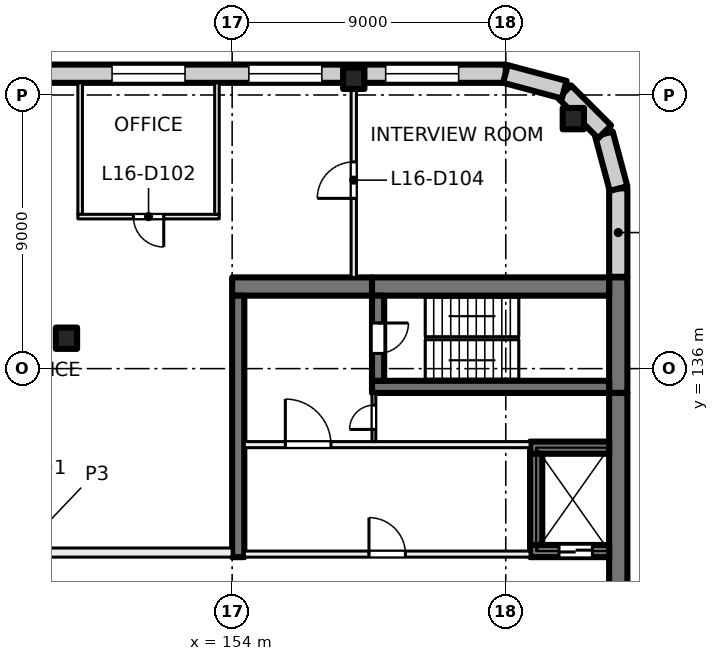
"""IFC4 building model, lengths in metres.
Left out: names, types, materials, properties, quantities, classifications, styles, units other than length and angle.
Written with IfcOpenShell. Run it as: python <this file> out.ifc"""

import sys

from ifc_helpers import new_model, si_unit, direction, frame, frame_2d, origin, origin_2d, place, context, subcontext, project, spatial, rectangle, extrude, element, fill, save


model = new_model("IFC4")
c1 = context("Model", 3, precision=1e-05, world=origin(), true_north=direction((0.0, 1.0)))
c2 = subcontext(c1, "Body", "Model", "MODEL_VIEW")
j1 = project(units=[si_unit("LENGTHUNIT", "METRE"), si_unit("PLANEANGLEUNIT", "RADIAN")], contexts=[c1])
p1 = place(None, origin())
s1 = spatial("IfcSite", under=j1, at=p1, CompositionType="ELEMENT")
p2 = place(p1, origin())
s2 = spatial("IfcBuilding", under=s1, at=p2, CompositionType="ELEMENT")
p3 = place(p2, frame((0.0, 0.0, 71.5)))
s3 = spatial("IfcBuildingStorey", under=s2, at=p3, CompositionType="ELEMENT", Elevation=71.5)
for number, where, z_axis, x_axis in (
    (1, (148.55, 137.0, 0.0), (0.0, 0.0, 1.0), (1.0, 0.0, 0.0)),
    (2, (165.223, 144.223, 0.0), (0.0, 0.0, 1.0), (1.0, 0.0, 0.0)),
    (3, (158.0, 145.55, 0.0), (0.0, 0.0, 1.0), (1.0, 0.0, 0.0)),
):
    element("IfcColumn", number, at=place(p3, frame(where, z_axis=z_axis, x_axis=x_axis)), inside=s3, PredefinedType="COLUMN", context=c2, shape_type="SweptSolid", body=[
        extrude(rectangle(XDim=0.7, YDim=0.7, at=origin_2d()), origin(), (0.0, 0.0, 1.0), 4.0),
    ])
p4 = place(p3, frame((166.7, 139.0, 0.0), z_axis=(0.0, 0.0, 1.0), x_axis=(0.0, -1.0, 0.0)))
e4 = element("IfcWall", 4, at=p4, inside=s3, PredefinedType="SHEAR", context=c2, shape_type="SweptSolid", body=[
    extrude(rectangle(XDim=3.8, YDim=0.6, at=frame_2d((1.9, 0.0))), origin(), (0.0, 0.0, 1.0), 4.0),
])
p5 = place(p3, frame((166.7, 135.2, 0.0), z_axis=(0.0, 0.0, 1.0), x_axis=(0.0, -1.0, 0.0)))
e5 = element("IfcWall", 5, at=p5, inside=s3, PredefinedType="SHEAR", context=c2, shape_type="SweptSolid", body=[
    extrude(rectangle(XDim=14.4, YDim=0.6, at=frame_2d((7.2, 0.0))), origin(), (0.0, 0.0, 1.0), 4.0),
])
p6 = place(p3, frame((166.4, 138.7, 0.0), z_axis=(0.0, 0.0, 1.0), x_axis=(-1.0, 0.0, 0.0)))
e6 = element("IfcWall", 6, at=p6, inside=s3, PredefinedType="SHEAR", context=c2, shape_type="SweptSolid", body=[
    extrude(rectangle(XDim=7.8, YDim=0.6, at=frame_2d((3.9, 0.0))), origin(), (0.0, 0.0, 1.0), 4.0),
])
p7 = place(p3, frame((158.6, 138.7, 0.0), z_axis=(0.0, 0.0, 1.0), x_axis=(-1.0, 0.0, 0.0)))
e7 = element("IfcWall", 7, at=p7, inside=s3, PredefinedType="SHEAR", context=c2, shape_type="SweptSolid", body=[
    extrude(rectangle(XDim=4.6, YDim=0.6, at=frame_2d((2.3, 0.0))), origin(), (0.0, 0.0, 1.0), 4.0),
])
p8 = place(p3, frame((166.4, 135.4, 0.0), z_axis=(0.0, 0.0, 1.0), x_axis=(-1.0, 0.0, 0.0)))
e8 = element("IfcWall", 8, at=p8, inside=s3, PredefinedType="SHEAR", context=c2, shape_type="SweptSolid", body=[
    extrude(rectangle(XDim=7.8, YDim=0.4, at=frame_2d((3.9, 0.0))), origin(), (0.0, 0.0, 1.0), 4.0),
])
p9 = place(p3, frame((158.8, 138.4, 0.0), z_axis=(0.0, 0.0, 1.0), x_axis=(0.0, -1.0, 0.0)))
e9 = element("IfcWall", 9, at=p9, inside=s3, PredefinedType="SHEAR", context=c2, shape_type="SweptSolid", body=[
    extrude(rectangle(XDim=2.8, YDim=0.4, at=frame_2d((1.4, 0.0))), origin(), (0.0, 0.0, 1.0), 4.0),
])
p10 = place(p9, frame((0.9, 0.0, 0.0)))
e10 = element("IfcOpeningElement", 10, at=p10, cuts=e9, PredefinedType="OPENING", context=c2, shape_type="SweptSolid", body=[
    extrude(rectangle(XDim=1.0, YDim=2.1, at=frame_2d((0.5, 1.05))), frame((0.0, 0.21, 0.0), z_axis=(0.0, -1.0, 0.0), x_axis=(1.0, 0.0, 0.0)), (0.0, 0.0, 1.0), 0.42),
])
p11 = place(p3, frame((166.4, 130.0, 0.0), z_axis=(0.0, 0.0, 1.0), x_axis=(-1.0, 0.0, 0.0)))
e11 = element("IfcWall", 11, at=p11, inside=s3, PredefinedType="SHEAR", context=c2, shape_type="SweptSolid", body=[
    extrude(rectangle(XDim=2.6, YDim=0.4, at=frame_2d((1.3, 0.0))), origin(), (0.0, 0.0, 1.0), 4.0),
])
p12 = place(p11, frame((0.55, 0.0, 0.0)))
e12 = element("IfcOpeningElement", 12, at=p12, cuts=e11, PredefinedType="OPENING", context=c2, shape_type="SweptSolid", body=[
    extrude(rectangle(XDim=1.1, YDim=2.1, at=frame_2d((0.55, 1.05))), frame((0.0, 0.21, 0.0), z_axis=(0.0, -1.0, 0.0), x_axis=(1.0, 0.0, 0.0)), (0.0, 0.0, 1.0), 0.42),
])
p13 = place(p3, frame((166.4, 133.4, 0.0), z_axis=(0.0, 0.0, 1.0), x_axis=(-1.0, 0.0, 0.0)))
e13 = element("IfcWall", 13, at=p13, inside=s3, PredefinedType="SHEAR", context=c2, shape_type="SweptSolid", body=[
    extrude(rectangle(XDim=2.6, YDim=0.4, at=frame_2d((1.3, 0.0))), origin(), (0.0, 0.0, 1.0), 4.0),
])
p14 = place(p3, frame((164.0, 133.2, 0.0), z_axis=(0.0, 0.0, 1.0), x_axis=(0.0, -1.0, 0.0)))
e14 = element("IfcWall", 14, at=p14, inside=s3, PredefinedType="SHEAR", context=c2, shape_type="SweptSolid", body=[
    extrude(rectangle(XDim=3.0, YDim=0.4, at=frame_2d((1.5, 0.0))), origin(), (0.0, 0.0, 1.0), 4.0),
])
p15 = place(p3, frame((154.2, 138.4, 0.0), z_axis=(0.0, 0.0, 1.0), x_axis=(0.0, -1.0, 0.0)))
e15 = element("IfcWall", 15, at=p15, inside=s3, PredefinedType="SHEAR", context=c2, shape_type="SweptSolid", body=[
    extrude(rectangle(XDim=8.6, YDim=0.4, at=frame_2d((4.3, 0.0))), origin(), (0.0, 0.0, 1.0), 4.0),
])
p16 = place(p3, frame((131.07, 145.7, 0.0), z_axis=(0.0, 0.0, 1.0), x_axis=(1.0, 0.0, 0.0)))
e16 = element("IfcWall", 16, at=p16, inside=s3, PredefinedType="SOLIDWALL", context=c2, shape_type="SweptSolid", body=[
    extrude(rectangle(XDim=31.93, YDim=0.6, at=frame_2d((15.965, 0.0))), origin(), (0.0, 0.0, 1.0), 3.625),
])
p17 = place(p16, frame((0.98, 0.0, 0.9)))
e17 = element("IfcOpeningElement", 17, at=p17, cuts=e16, PredefinedType="OPENING", context=c2, shape_type="SweptSolid", body=[
    extrude(rectangle(XDim=2.4, YDim=2.4, at=frame_2d((1.2, 1.2))), frame((0.0, 0.31, 0.0), z_axis=(0.0, -1.0, 0.0), x_axis=(1.0, 0.0, 0.0)), (0.0, 0.0, 1.0), 0.62),
])
p18 = place(p16, frame((5.48, 0.0, 0.9)))
e18 = element("IfcOpeningElement", 18, at=p18, cuts=e16, PredefinedType="OPENING", context=c2, shape_type="SweptSolid", body=[
    extrude(rectangle(XDim=2.4, YDim=2.4, at=frame_2d((1.2, 1.2))), frame((0.0, 0.31, 0.0), z_axis=(0.0, -1.0, 0.0), x_axis=(1.0, 0.0, 0.0)), (0.0, 0.0, 1.0), 0.62),
])
p19 = place(p16, frame((9.98, 0.0, 0.9)))
e19 = element("IfcOpeningElement", 19, at=p19, cuts=e16, PredefinedType="OPENING", context=c2, shape_type="SweptSolid", body=[
    extrude(rectangle(XDim=2.4, YDim=2.4, at=frame_2d((1.2, 1.2))), frame((0.0, 0.31, 0.0), z_axis=(0.0, -1.0, 0.0), x_axis=(1.0, 0.0, 0.0)), (0.0, 0.0, 1.0), 0.62),
])
p20 = place(p16, frame((14.48, 0.0, 0.9)))
e20 = element("IfcOpeningElement", 20, at=p20, cuts=e16, PredefinedType="OPENING", context=c2, shape_type="SweptSolid", body=[
    extrude(rectangle(XDim=2.4, YDim=2.4, at=frame_2d((1.2, 1.2))), frame((0.0, 0.31, 0.0), z_axis=(0.0, -1.0, 0.0), x_axis=(1.0, 0.0, 0.0)), (0.0, 0.0, 1.0), 0.62),
])
p21 = place(p16, frame((18.98, 0.0, 0.9)))
e21 = element("IfcOpeningElement", 21, at=p21, cuts=e16, PredefinedType="OPENING", context=c2, shape_type="SweptSolid", body=[
    extrude(rectangle(XDim=2.4, YDim=2.4, at=frame_2d((1.2, 1.2))), frame((0.0, 0.31, 0.0), z_axis=(0.0, -1.0, 0.0), x_axis=(1.0, 0.0, 0.0)), (0.0, 0.0, 1.0), 0.62),
])
p22 = place(p16, frame((23.48, 0.0, 0.9)))
e22 = element("IfcOpeningElement", 22, at=p22, cuts=e16, PredefinedType="OPENING", context=c2, shape_type="SweptSolid", body=[
    extrude(rectangle(XDim=2.4, YDim=2.4, at=frame_2d((1.2, 1.2))), frame((0.0, 0.31, 0.0), z_axis=(0.0, -1.0, 0.0), x_axis=(1.0, 0.0, 0.0)), (0.0, 0.0, 1.0), 0.62),
])
p23 = place(p16, frame((27.98, 0.0, 0.9)))
e23 = element("IfcOpeningElement", 23, at=p23, cuts=e16, PredefinedType="OPENING", context=c2, shape_type="SweptSolid", body=[
    extrude(rectangle(XDim=2.4, YDim=2.4, at=frame_2d((1.2, 1.2))), frame((0.0, 0.31, 0.0), z_axis=(0.0, -1.0, 0.0), x_axis=(1.0, 0.0, 0.0)), (0.0, 0.0, 1.0), 0.62),
])
p24 = place(p3, frame((166.7, 141.93, 0.0), z_axis=(0.0, 0.0, 1.0), x_axis=(0.0, -1.0, 0.0)))
e24 = element("IfcWall", 24, at=p24, inside=s3, PredefinedType="SOLIDWALL", context=c2, shape_type="SweptSolid", body=[
    extrude(rectangle(XDim=2.91, YDim=0.6, at=frame_2d((1.455, 0.0))), origin(), (0.0, 0.0, 1.0), 3.625),
])
for number, where, z_axis, x_axis in (
    (25, (166.229, 143.719, 0.0), (0.0, 0.0, 1.0), (0.259, -0.966, 0.0)),
    (26, (164.936, 145.104, 0.0), (0.0, 0.0, 1.0), (0.707, -0.707, 0.0)),
):
    element("IfcWall", number, at=place(p3, frame(where, z_axis=z_axis, x_axis=x_axis)), inside=s3, PredefinedType="SOLIDWALL", context=c2, shape_type="SweptSolid", body=[
        extrude(rectangle(XDim=1.861, YDim=0.6, at=frame_2d((0.93, 0.0))), origin(), (0.0, 0.0, 1.0), 3.625),
    ])
p25 = place(p3, frame((162.99, 145.692, 0.0), z_axis=(0.0, 0.0, 1.0), x_axis=(0.965920269068, -0.258839784042, 0.0)))
e27 = element("IfcWall", 27, at=p25, inside=s3, PredefinedType="SOLIDWALL", context=c2, shape_type="SweptSolid", body=[
    extrude(rectangle(XDim=2.0, YDim=0.6, at=frame_2d((1.0, 0.0))), origin(), (0.0, 0.0, 1.0), 3.625),
])
p26 = place(p3, frame((154.4, 129.9, 0.0), z_axis=(0.0, 0.0, 1.0), x_axis=(1.0, 0.0, 0.0)))
e28 = element("IfcWall", 28, at=p26, inside=s3, PredefinedType="PARTITIONING", context=c2, shape_type="SweptSolid", body=[
    extrude(rectangle(XDim=9.4, YDim=0.2, at=frame_2d((4.7, 0.0))), origin(), (0.0, 0.0, 1.0), 3.625),
])
p27 = place(p26, frame((4.1, 0.0, 0.0)))
e29 = element("IfcOpeningElement", 29, at=p27, cuts=e28, PredefinedType="OPENING", context=c2, shape_type="SweptSolid", body=[
    extrude(rectangle(XDim=1.2, YDim=2.1, at=frame_2d((0.6, 1.05))), frame((0.0, 0.11, 0.0), z_axis=(0.0, -1.0, 0.0), x_axis=(1.0, 0.0, 0.0)), (0.0, 0.0, 1.0), 0.22),
])
p28 = place(p3, frame((154.4, 133.5, 0.0), z_axis=(0.0, 0.0, 1.0), x_axis=(1.0, 0.0, 0.0)))
e30 = element("IfcWall", 30, at=p28, inside=s3, PredefinedType="PARTITIONING", context=c2, shape_type="SweptSolid", body=[
    extrude(rectangle(XDim=9.4, YDim=0.2, at=frame_2d((4.7, 0.0))), origin(), (0.0, 0.0, 1.0), 3.625),
])
p29 = place(p28, frame((1.35, 0.0, 0.0)))
e31 = element("IfcOpeningElement", 31, at=p29, cuts=e30, PredefinedType="OPENING", context=c2, shape_type="SweptSolid", body=[
    extrude(rectangle(XDim=1.5, YDim=2.1, at=frame_2d((0.75, 1.05))), frame((0.0, 0.11, 0.0), z_axis=(0.0, -1.0, 0.0), x_axis=(1.0, 0.0, 0.0)), (0.0, 0.0, 1.0), 0.22),
])
p30 = place(p3, frame((158.663, 133.6, 0.0), z_axis=(0.0, 0.0, 1.0), x_axis=(0.0, 1.0, 0.0)))
e32 = element("IfcWall", 32, at=p30, inside=s3, PredefinedType="PARTITIONING", context=c2, shape_type="SweptSolid", body=[
    extrude(rectangle(XDim=1.6, YDim=0.125, at=frame_2d((0.8, 0.0))), origin(), (0.0, 0.0, 1.0), 3.625),
])
p31 = place(p30, frame((0.4, 0.0, 0.0)))
e33 = element("IfcOpeningElement", 33, at=p31, cuts=e32, PredefinedType="OPENING", context=c2, shape_type="SweptSolid", body=[
    extrude(rectangle(XDim=0.8, YDim=2.1, at=frame_2d((0.4, 1.05))), frame((0.0, 0.073, 0.0), z_axis=(0.0, -1.0, 0.0), x_axis=(1.0, 0.0, 0.0)), (0.0, 0.0, 1.0), 0.145),
])
p32 = place(p3, frame((140.0, 129.95, 0.0), z_axis=(0.0, 0.0, 1.0), x_axis=(1.0, 0.0, 0.0)))
e34 = element("IfcWall", 34, at=p32, inside=s3, PredefinedType="PARTITIONING", context=c2, shape_type="SweptSolid", body=[
    extrude(rectangle(XDim=14.0, YDim=0.3, at=frame_2d((7.0, 0.0))), origin(), (0.0, 0.0, 1.0), 3.625),
])
p33 = place(p32, frame((6.1, 0.0, 0.0)))
e35 = element("IfcOpeningElement", 35, at=p33, cuts=e34, PredefinedType="OPENING", context=c2, shape_type="SweptSolid", body=[
    extrude(rectangle(XDim=1.8, YDim=2.1, at=frame_2d((0.9, 1.05))), frame((0.0, 0.16, 0.0), z_axis=(0.0, -1.0, 0.0), x_axis=(1.0, 0.0, 0.0)), (0.0, 0.0, 1.0), 0.32),
])
p34 = place(p3, frame((149.0, 141.075, 0.0), z_axis=(0.0, 0.0, 1.0), x_axis=(0.0, 1.0, 0.0)))
e36 = element("IfcWall", 36, at=p34, inside=s3, PredefinedType="PARTITIONING", context=c2, shape_type="SweptSolid", body=[
    extrude(rectangle(XDim=4.325, YDim=0.15, at=frame_2d((2.163, 0.0))), origin(), (0.0, 0.0, 1.0), 3.625),
])
p35 = place(p3, frame((153.575, 141.0, 0.0), z_axis=(0.0, 0.0, 1.0), x_axis=(-1.0, 0.0, 0.0)))
e37 = element("IfcWall", 37, at=p35, inside=s3, PredefinedType="PARTITIONING", context=c2, shape_type="SweptSolid", body=[
    extrude(rectangle(XDim=4.65, YDim=0.15, at=frame_2d((2.325, 0.0))), origin(), (0.0, 0.0, 1.0), 3.625),
])
p36 = place(p35, frame((1.825, 0.0, 0.0)))
e38 = element("IfcOpeningElement", 38, at=p36, cuts=e37, PredefinedType="OPENING", context=c2, shape_type="SweptSolid", body=[
    extrude(rectangle(XDim=1.0, YDim=2.1, at=frame_2d((0.5, 1.05))), frame((0.0, 0.085, 0.0), z_axis=(0.0, -1.0, 0.0), x_axis=(1.0, 0.0, 0.0)), (0.0, 0.0, 1.0), 0.17),
])
p37 = place(p3, frame((153.5, 145.4, 0.0), z_axis=(0.0, 0.0, 1.0), x_axis=(0.0, -1.0, 0.0)))
e39 = element("IfcWall", 39, at=p37, inside=s3, PredefinedType="PARTITIONING", context=c2, shape_type="SweptSolid", body=[
    extrude(rectangle(XDim=4.325, YDim=0.15, at=frame_2d((2.163, 0.0))), origin(), (0.0, 0.0, 1.0), 3.625),
])
p38 = place(p3, frame((158.0, 139.0, 0.0), z_axis=(0.0, 0.0, 1.0), x_axis=(0.0, 1.0, 0.0)))
e40 = element("IfcWall", 40, at=p38, inside=s3, PredefinedType="PARTITIONING", context=c2, shape_type="SweptSolid", body=[
    extrude(rectangle(XDim=6.4, YDim=0.175, at=frame_2d((3.2, 0.0))), origin(), (0.0, 0.0, 1.0), 3.625),
])
p39 = place(p38, frame((2.6, 0.0, 0.0)))
e41 = element("IfcOpeningElement", 41, at=p39, cuts=e40, PredefinedType="OPENING", context=c2, shape_type="SweptSolid", body=[
    extrude(rectangle(XDim=1.2, YDim=2.1, at=frame_2d((0.6, 1.05))), frame((0.0, 0.097, 0.0), z_axis=(0.0, -1.0, 0.0), x_axis=(1.0, 0.0, 0.0)), (0.0, 0.0, 1.0), 0.195),
])
p40 = place(p21, origin())
e42 = element("IfcWindow", 42, at=p40, inside=s3, PartitioningType="SINGLE_PANEL", PredefinedType="WINDOW", context=c2, shape_type="SweptSolid", body=[
    extrude(rectangle(XDim=2.4, YDim=2.4, at=frame_2d((1.2, 1.2))), frame((0.0, 0.03, 0.0), z_axis=(0.0, -1.0, 0.0), x_axis=(1.0, 0.0, 0.0)), (0.0, 0.0, 1.0), 0.06),
])
fill(e21, e42)
p41 = place(p22, origin())
e43 = element("IfcWindow", 43, at=p41, inside=s3, PartitioningType="SINGLE_PANEL", PredefinedType="WINDOW", context=c2, shape_type="SweptSolid", body=[
    extrude(rectangle(XDim=2.4, YDim=2.4, at=frame_2d((1.2, 1.2))), frame((0.0, 0.03, 0.0), z_axis=(0.0, -1.0, 0.0), x_axis=(1.0, 0.0, 0.0)), (0.0, 0.0, 1.0), 0.06),
])
fill(e22, e43)
p42 = place(p23, origin())
e44 = element("IfcWindow", 44, at=p42, inside=s3, PartitioningType="SINGLE_PANEL", PredefinedType="WINDOW", context=c2, shape_type="SweptSolid", body=[
    extrude(rectangle(XDim=2.4, YDim=2.4, at=frame_2d((1.2, 1.2))), frame((0.0, 0.03, 0.0), z_axis=(0.0, -1.0, 0.0), x_axis=(1.0, 0.0, 0.0)), (0.0, 0.0, 1.0), 0.06),
])
fill(e23, e44)
p43 = place(p12, origin())
e45 = element("IfcDoor", 45, at=p43, inside=s3, OperationType="DOUBLE_DOOR_SLIDING", PredefinedType="DOOR", context=c2, shape_type="SweptSolid", body=[
    extrude(rectangle(XDim=1.1, YDim=2.1, at=frame_2d((0.55, 1.05))), frame((0.0, 0.025, 0.0), z_axis=(0.0, -1.0, 0.0), x_axis=(1.0, 0.0, 0.0)), (0.0, 0.0, 1.0), 0.05),
])
fill(e12, e45)
p44 = place(p27, origin())
e46 = element("IfcDoor", 46, at=p44, inside=s3, OperationType="DOUBLE_DOOR_SINGLE_SWING", PredefinedType="DOOR", context=c2, shape_type="SweptSolid", body=[
    extrude(rectangle(XDim=1.2, YDim=2.1, at=frame_2d((0.6, 1.05))), frame((0.0, 0.025, 0.0), z_axis=(0.0, -1.0, 0.0), x_axis=(1.0, 0.0, 0.0)), (0.0, 0.0, 1.0), 0.05),
])
fill(e29, e46)
p45 = place(p29, origin())
e47 = element("IfcDoor", 47, at=p45, inside=s3, OperationType="DOUBLE_DOOR_SINGLE_SWING", PredefinedType="DOOR", context=c2, shape_type="SweptSolid", body=[
    extrude(rectangle(XDim=1.5, YDim=2.1, at=frame_2d((0.75, 1.05))), frame((0.0, 0.025, 0.0), z_axis=(0.0, -1.0, 0.0), x_axis=(1.0, 0.0, 0.0)), (0.0, 0.0, 1.0), 0.05),
])
fill(e31, e47)
p46 = place(p10, origin())
e48 = element("IfcDoor", 48, at=p46, inside=s3, OperationType="SINGLE_SWING_RIGHT", PredefinedType="DOOR", context=c2, shape_type="SweptSolid", body=[
    extrude(rectangle(XDim=1.0, YDim=2.1, at=frame_2d((0.5, 1.05))), frame((0.0, 0.025, 0.0), z_axis=(0.0, -1.0, 0.0), x_axis=(1.0, 0.0, 0.0)), (0.0, 0.0, 1.0), 0.05),
])
fill(e10, e48)
p47 = place(p31, origin())
e49 = element("IfcDoor", 49, at=p47, inside=s3, OperationType="SINGLE_SWING_LEFT", PredefinedType="DOOR", context=c2, shape_type="SweptSolid", body=[
    extrude(rectangle(XDim=0.8, YDim=2.1, at=frame_2d((0.4, 1.05))), frame((0.0, 0.025, 0.0), z_axis=(0.0, -1.0, 0.0), x_axis=(1.0, 0.0, 0.0)), (0.0, 0.0, 1.0), 0.05),
])
fill(e33, e49)
p48 = place(p36, origin())
e50 = element("IfcDoor", 50, at=p48, inside=s3, OperationType="SINGLE_SWING_LEFT", PredefinedType="DOOR", context=c2, shape_type="SweptSolid", body=[
    extrude(rectangle(XDim=1.0, YDim=2.1, at=frame_2d((0.5, 1.05))), frame((0.0, 0.025, 0.0), z_axis=(0.0, -1.0, 0.0), x_axis=(1.0, 0.0, 0.0)), (0.0, 0.0, 1.0), 0.05),
])
fill(e38, e50)
p49 = place(p39, origin())
e51 = element("IfcDoor", 51, at=p49, inside=s3, OperationType="DOUBLE_DOOR_SINGLE_SWING", PredefinedType="DOOR", context=c2, shape_type="SweptSolid", body=[
    extrude(rectangle(XDim=1.2, YDim=2.1, at=frame_2d((0.6, 1.05))), frame((0.0, 0.025, 0.0), z_axis=(0.0, -1.0, 0.0), x_axis=(1.0, 0.0, 0.0)), (0.0, 0.0, 1.0), 0.05),
])
fill(e41, e51)
save(model, sys.argv[1])
